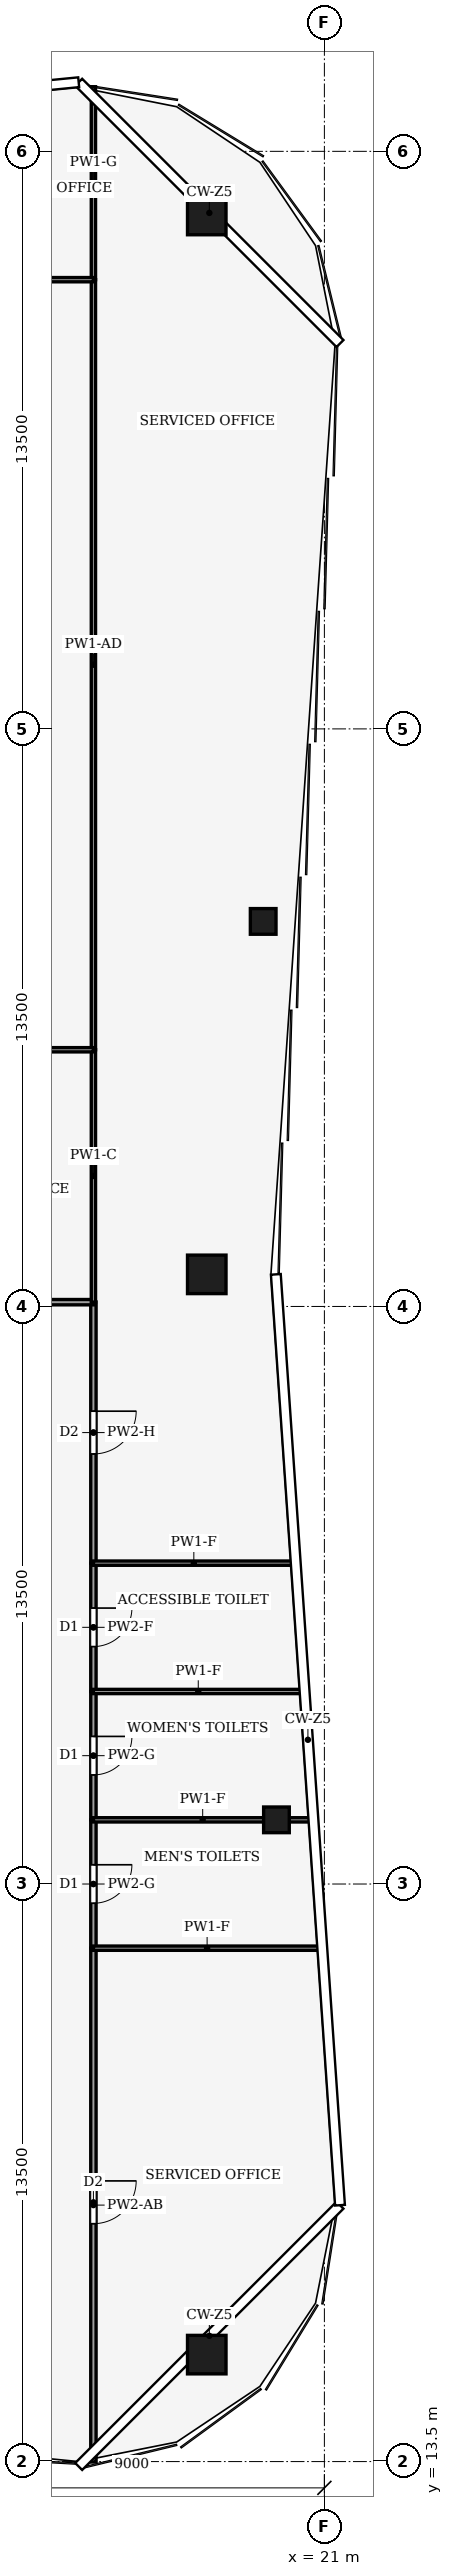
"""IFC4 building model, lengths in metres.
Left out: names, types, materials, properties, quantities, classifications, styles, units other than length and angle.
Written with IfcOpenShell. Run it as: python <this file> out.ifc"""

import sys

from ifc_helpers import new_model, si_unit, direction, frame, frame_2d, origin, origin_2d, place, context, subcontext, project, spatial, rectangle, hollow_rectangle, extrude, element, fill, save


model = new_model("IFC4")
c1 = context("Model", 3, precision=1e-05, world=origin(), true_north=direction((0.0, 1.0)))
c2 = subcontext(c1, "Body", "Model", "MODEL_VIEW")
j1 = project(units=[si_unit("LENGTHUNIT", "METRE"), si_unit("PLANEANGLEUNIT", "RADIAN")], contexts=[c1])
p1 = place(None, origin())
s1 = spatial("IfcSite", under=j1, at=p1, CompositionType="ELEMENT")
p2 = place(p1, origin())
s2 = spatial("IfcBuilding", under=s1, at=p2, CompositionType="ELEMENT")
p3 = place(p2, frame((0.0, 0.0, 302.0)))
s3 = spatial("IfcBuildingStorey", under=s2, at=p3, CompositionType="ELEMENT", Elevation=302.0)
for number, where, z_axis, x_axis in (
    (1, (18.25, 66.0, 0.0), (0.0, 0.0, 1.0), (1.0, 0.0, 0.0)),
    (2, (18.25, 41.25, 0.0), (0.0, 0.0, 1.0), (1.0, 0.0, 0.0)),
    (3, (18.25, 16.0, 0.0), (0.0, 0.0, 1.0), (1.0, 0.0, 0.0)),
):
    element("IfcColumn", number, at=place(p3, frame(where, z_axis=z_axis, x_axis=x_axis)), inside=s3, PredefinedType="COLUMN", context=c2, shape_type="SweptSolid", body=[
        extrude(hollow_rectangle(XDim=0.9, YDim=0.9, WallThickness=0.04, at=origin_2d()), origin(), (0.0, 0.0, 1.0), 4.0),
    ])
for number, where, z_axis, x_axis in (
    (4, (19.879, 28.5, 0.0), (0.0, 0.0, 1.0), (1.0, 0.0, 0.0)),
    (5, (19.569, 49.5, 0.0), (0.0, 0.0, 1.0), (1.0, 0.0, 0.0)),
):
    element("IfcColumn", number, at=place(p3, frame(where, z_axis=z_axis, x_axis=x_axis)), inside=s3, PredefinedType="COLUMN", context=c2, shape_type="SweptSolid", body=[
        extrude(hollow_rectangle(XDim=0.6, YDim=0.6, WallThickness=0.025, at=origin_2d()), origin(), (0.0, 0.0, 1.0), 4.0),
    ])
p4 = place(p3, frame((15.6, 25.5, 0.0), z_axis=(0.0, 0.0, 1.0), x_axis=(0.0, -1.0, 0.0)))
e6 = element("IfcWall", 6, at=p4, inside=s3, PredefinedType="PARTITIONING", context=c2, shape_type="SweptSolid", body=[
    extrude(rectangle(XDim=12.01, YDim=0.125, at=frame_2d((6.005, 0.0))), origin(), (0.0, 0.0, 1.0), 2.93),
])
p5 = place(p4, frame((5.44, 0.0, 0.0)))
e7 = element("IfcOpeningElement", 7, at=p5, cuts=e6, PredefinedType="OPENING", context=c2, shape_type="SweptSolid", body=[
    extrude(rectangle(XDim=1.0, YDim=2.1, at=frame_2d((0.5, 1.05))), frame((0.0, 0.073, 0.0), z_axis=(0.0, -1.0, 0.0), x_axis=(1.0, 0.0, 0.0)), (0.0, 0.0, 1.0), 0.145),
])
p6 = place(p3, frame((15.6, 28.5, 0.0), z_axis=(0.0, 0.0, 1.0), x_axis=(0.0, -1.0, 0.0)))
e8 = element("IfcWall", 8, at=p6, inside=s3, PredefinedType="PARTITIONING", context=c2, shape_type="SweptSolid", body=[
    extrude(rectangle(XDim=3.0, YDim=0.125, at=frame_2d((1.5, 0.0))), origin(), (0.0, 0.0, 1.0), 3.87),
])
p7 = place(p6, frame((1.05, 0.0, 0.0)))
e9 = element("IfcOpeningElement", 9, at=p7, cuts=e8, PredefinedType="OPENING", context=c2, shape_type="SweptSolid", body=[
    extrude(rectangle(XDim=0.9, YDim=2.1, at=frame_2d((0.45, 1.05))), frame((0.0, 0.073, 0.0), z_axis=(0.0, -1.0, 0.0), x_axis=(1.0, 0.0, 0.0)), (0.0, 0.0, 1.0), 0.145),
])
p8 = place(p3, frame((15.6, 31.5, 0.0), z_axis=(0.0, 0.0, 1.0), x_axis=(0.0, -1.0, 0.0)))
e10 = element("IfcWall", 10, at=p8, inside=s3, PredefinedType="PARTITIONING", context=c2, shape_type="SweptSolid", body=[
    extrude(rectangle(XDim=3.0, YDim=0.125, at=frame_2d((1.5, 0.0))), origin(), (0.0, 0.0, 1.0), 3.87),
])
p9 = place(p8, frame((1.05, 0.0, 0.0)))
e11 = element("IfcOpeningElement", 11, at=p9, cuts=e10, PredefinedType="OPENING", context=c2, shape_type="SweptSolid", body=[
    extrude(rectangle(XDim=0.9, YDim=2.1, at=frame_2d((0.45, 1.05))), frame((0.0, 0.073, 0.0), z_axis=(0.0, -1.0, 0.0), x_axis=(1.0, 0.0, 0.0)), (0.0, 0.0, 1.0), 0.145),
])
p10 = place(p3, frame((15.6, 34.5, 0.0), z_axis=(0.0, 0.0, 1.0), x_axis=(0.0, -1.0, 0.0)))
e12 = element("IfcWall", 12, at=p10, inside=s3, PredefinedType="PARTITIONING", context=c2, shape_type="SweptSolid", body=[
    extrude(rectangle(XDim=3.0, YDim=0.125, at=frame_2d((1.5, 0.0))), origin(), (0.0, 0.0, 1.0), 3.54),
])
p11 = place(p10, frame((1.05, 0.0, 0.0)))
e13 = element("IfcOpeningElement", 13, at=p11, cuts=e12, PredefinedType="OPENING", context=c2, shape_type="SweptSolid", body=[
    extrude(rectangle(XDim=0.9, YDim=2.1, at=frame_2d((0.45, 1.05))), frame((0.0, 0.073, 0.0), z_axis=(0.0, -1.0, 0.0), x_axis=(1.0, 0.0, 0.0)), (0.0, 0.0, 1.0), 0.145),
])
p12 = place(p3, frame((15.6, 40.604, 0.0), z_axis=(0.0, 0.0, 1.0), x_axis=(0.0, -1.0, 0.0)))
e14 = element("IfcWall", 14, at=p12, inside=s3, PredefinedType="PARTITIONING", context=c2, shape_type="SweptSolid", body=[
    extrude(rectangle(XDim=6.104, YDim=0.125, at=frame_2d((3.052, 0.0))), origin(), (0.0, 0.0, 1.0), 3.14),
])
p13 = place(p12, frame((2.552, 0.0, 0.0)))
e15 = element("IfcOpeningElement", 15, at=p13, cuts=e14, PredefinedType="OPENING", context=c2, shape_type="SweptSolid", body=[
    extrude(rectangle(XDim=1.0, YDim=2.1, at=frame_2d((0.5, 1.05))), frame((0.0, 0.073, 0.0), z_axis=(0.0, -1.0, 0.0), x_axis=(1.0, 0.0, 0.0)), (0.0, 0.0, 1.0), 0.145),
])
p14 = place(p3, frame((9.0, 40.6, 0.0), z_axis=(0.0, 0.0, 1.0), x_axis=(1.0, 0.0, 0.0)))
e16 = element("IfcWall", 16, at=p14, inside=s3, PredefinedType="PARTITIONING", context=c2, shape_type="SweptSolid", body=[
    extrude(rectangle(XDim=6.6, YDim=0.125, at=frame_2d((3.3, 0.0))), origin(), (0.0, 0.0, 1.0), 3.39),
])
p15 = place(p14, frame((2.8, 0.0, 0.0)))
e17 = element("IfcOpeningElement", 17, at=p15, cuts=e16, PredefinedType="OPENING", context=c2, shape_type="SweptSolid", body=[
    extrude(rectangle(XDim=1.0, YDim=2.1, at=frame_2d((0.5, 1.05))), frame((0.0, 0.073, 0.0), z_axis=(0.0, -1.0, 0.0), x_axis=(1.0, 0.0, 0.0)), (0.0, 0.0, 1.0), 0.145),
])
p16 = place(p3, frame((20.916, 25.5, 0.0), z_axis=(0.0, 0.0, 1.0), x_axis=(-1.0, 0.0, 0.0)))
e18 = element("IfcWall", 18, at=p16, inside=s3, PredefinedType="PARTITIONING", context=c2, shape_type="SweptSolid", body=[
    extrude(rectangle(XDim=5.316, YDim=0.1, at=frame_2d((2.658, 0.0))), origin(), (0.0, 0.0, 1.0), 3.04),
])
p17 = place(p3, frame((20.709, 28.5, 0.0), z_axis=(0.0, 0.0, 1.0), x_axis=(-1.0, 0.0, 0.0)))
e19 = element("IfcWall", 19, at=p17, inside=s3, PredefinedType="PARTITIONING", context=c2, shape_type="SweptSolid", body=[
    extrude(rectangle(XDim=5.109, YDim=0.1, at=frame_2d((2.555, 0.0))), origin(), (0.0, 0.0, 1.0), 3.04),
])
p18 = place(p3, frame((20.502, 31.5, 0.0), z_axis=(0.0, 0.0, 1.0), x_axis=(-1.0, 0.0, 0.0)))
e20 = element("IfcWall", 20, at=p18, inside=s3, PredefinedType="PARTITIONING", context=c2, shape_type="SweptSolid", body=[
    extrude(rectangle(XDim=4.902, YDim=0.1, at=frame_2d((2.451, 0.0))), origin(), (0.0, 0.0, 1.0), 3.04),
])
p19 = place(p3, frame((20.295, 34.5, 0.0), z_axis=(0.0, 0.0, 1.0), x_axis=(-1.0, 0.0, 0.0)))
e21 = element("IfcWall", 21, at=p19, inside=s3, PredefinedType="PARTITIONING", context=c2, shape_type="SweptSolid", body=[
    extrude(rectangle(XDim=4.695, YDim=0.1, at=frame_2d((2.348, 0.0))), origin(), (0.0, 0.0, 1.0), 3.04),
])
p20 = place(p3, frame((15.6, 46.5, 0.0), z_axis=(0.0, 0.0, 1.0), x_axis=(0.0, -1.0, 0.0)))
e22 = element("IfcWall", 22, at=p20, inside=s3, PredefinedType="PARTITIONING", context=c2, shape_type="SweptSolid", body=[
    extrude(rectangle(XDim=5.9, YDim=0.1, at=frame_2d((2.95, 0.0))), origin(), (0.0, 0.0, 1.0), 3.87),
])
p21 = place(p3, frame((15.6, 64.5, 0.0), z_axis=(0.0, 0.0, 1.0), x_axis=(0.0, -1.0, 0.0)))
e23 = element("IfcWall", 23, at=p21, inside=s3, PredefinedType="PARTITIONING", context=c2, shape_type="SweptSolid", body=[
    extrude(rectangle(XDim=18.0, YDim=0.1, at=frame_2d((9.0, 0.0))), origin(), (0.0, 0.0, 1.0), 3.35),
])
p22 = place(p3, frame((15.6, 69.01, 0.0), z_axis=(0.0, 0.0, 1.0), x_axis=(0.0, -1.0, 0.0)))
e24 = element("IfcWall", 24, at=p22, inside=s3, PredefinedType="PARTITIONING", context=c2, shape_type="SweptSolid", body=[
    extrude(rectangle(XDim=4.51, YDim=0.1, at=frame_2d((2.255, 0.0))), origin(), (0.0, 0.0, 1.0), 2.93),
])
p23 = place(p3, frame((15.6, 46.5, 0.0), z_axis=(0.0, 0.0, 1.0), x_axis=(-1.0, 0.0, 0.0)))
e25 = element("IfcWall", 25, at=p23, inside=s3, PredefinedType="PARTITIONING", context=c2, shape_type="SweptSolid", body=[
    extrude(rectangle(XDim=6.604, YDim=0.1, at=frame_2d((3.302, 0.0))), origin(), (0.0, 0.0, 1.0), 3.39),
])
p24 = place(p3, frame((3.0, 64.5, 0.0), z_axis=(0.0, 0.0, 1.0), x_axis=(1.0, 0.0, 0.0)))
e26 = element("IfcWall", 26, at=p24, inside=s3, PredefinedType="PARTITIONING", context=c2, shape_type="SweptSolid", body=[
    extrude(rectangle(XDim=12.6, YDim=0.1, at=frame_2d((6.3, 0.0))), origin(), (0.0, 0.0, 1.0), 3.24),
])
p25 = place(p24, frame((5.8, 0.0, 0.0)))
e27 = element("IfcOpeningElement", 27, at=p25, cuts=e26, PredefinedType="OPENING", context=c2, shape_type="SweptSolid", body=[
    extrude(rectangle(XDim=1.0, YDim=2.1, at=frame_2d((0.5, 1.05))), frame((0.0, 0.06, 0.0), z_axis=(0.0, -1.0, 0.0), x_axis=(1.0, 0.0, 0.0)), (0.0, 0.0, 1.0), 0.12),
])
p26 = place(p5, origin())
e28 = element("IfcDoor", 28, at=p26, inside=s3, OperationType="SINGLE_SWING_LEFT", PredefinedType="DOOR", context=c2, shape_type="SweptSolid", body=[
    extrude(rectangle(XDim=1.0, YDim=2.1, at=frame_2d((0.5, 1.05))), frame((0.0, 0.025, 0.0), z_axis=(0.0, -1.0, 0.0), x_axis=(1.0, 0.0, 0.0)), (0.0, 0.0, 1.0), 0.05),
])
fill(e7, e28)
p27 = place(p7, origin())
e29 = element("IfcDoor", 29, at=p27, inside=s3, OperationType="SINGLE_SWING_LEFT", PredefinedType="DOOR", context=c2, shape_type="SweptSolid", body=[
    extrude(rectangle(XDim=0.9, YDim=2.1, at=frame_2d((0.45, 1.05))), frame((0.0, 0.025, 0.0), z_axis=(0.0, -1.0, 0.0), x_axis=(1.0, 0.0, 0.0)), (0.0, 0.0, 1.0), 0.05),
])
fill(e9, e29)
p28 = place(p9, origin())
e30 = element("IfcDoor", 30, at=p28, inside=s3, OperationType="SINGLE_SWING_RIGHT", PredefinedType="DOOR", context=c2, shape_type="SweptSolid", body=[
    extrude(rectangle(XDim=0.9, YDim=2.1, at=frame_2d((0.45, 1.05))), frame((0.0, 0.025, 0.0), z_axis=(0.0, -1.0, 0.0), x_axis=(1.0, 0.0, 0.0)), (0.0, 0.0, 1.0), 0.05),
])
fill(e11, e30)
p29 = place(p11, origin())
e31 = element("IfcDoor", 31, at=p29, inside=s3, OperationType="SINGLE_SWING_LEFT", PredefinedType="DOOR", context=c2, shape_type="SweptSolid", body=[
    extrude(rectangle(XDim=0.9, YDim=2.1, at=frame_2d((0.45, 1.05))), frame((0.0, 0.025, 0.0), z_axis=(0.0, -1.0, 0.0), x_axis=(1.0, 0.0, 0.0)), (0.0, 0.0, 1.0), 0.05),
])
fill(e13, e31)
p30 = place(p13, origin())
e32 = element("IfcDoor", 32, at=p30, inside=s3, OperationType="SINGLE_SWING_RIGHT", PredefinedType="DOOR", context=c2, shape_type="SweptSolid", body=[
    extrude(rectangle(XDim=1.0, YDim=2.1, at=frame_2d((0.5, 1.05))), frame((0.0, 0.025, 0.0), z_axis=(0.0, -1.0, 0.0), x_axis=(1.0, 0.0, 0.0)), (0.0, 0.0, 1.0), 0.05),
])
fill(e15, e32)
save(model, sys.argv[1])
